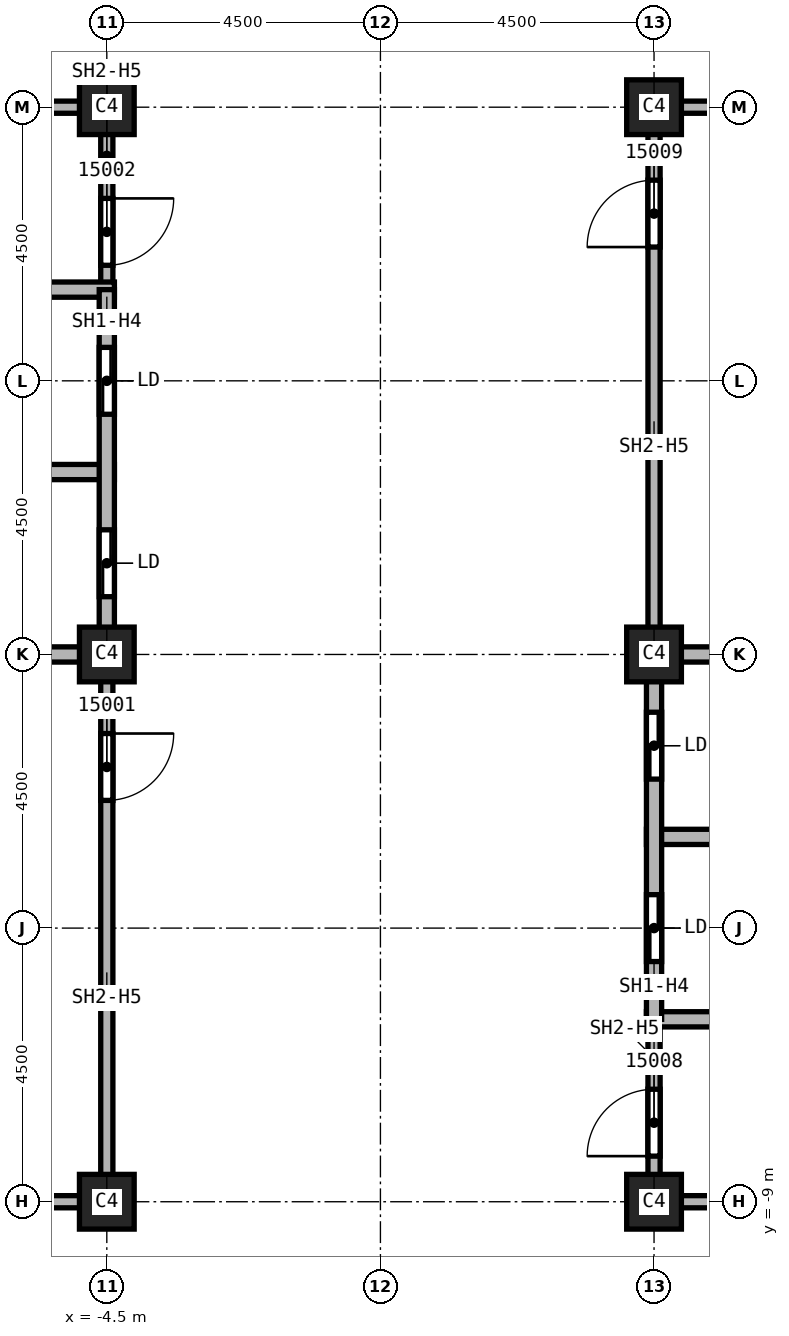
"""IFC4 building model, lengths in metres.
Left out: names, types, materials, properties, quantities, classifications, styles, units other than length and angle.
Written with IfcOpenShell. Run it as: python <this file> out.ifc"""

import sys

from ifc_helpers import new_model, si_unit, direction, frame, frame_2d, origin, origin_2d, place, context, subcontext, project, spatial, rectangle, extrude, element, fill, save


model = new_model("IFC4")
c1 = context("Model", 3, precision=1e-05, world=origin(), true_north=direction((0.0, 1.0)))
c2 = subcontext(c1, "Body", "Model", "MODEL_VIEW")
j1 = project(units=[si_unit("LENGTHUNIT", "METRE"), si_unit("PLANEANGLEUNIT", "RADIAN")], contexts=[c1])
p1 = place(None, origin())
s1 = spatial("IfcSite", under=j1, at=p1, CompositionType="ELEMENT")
p2 = place(p1, origin())
s2 = spatial("IfcBuilding", under=s1, at=p2, CompositionType="ELEMENT")
p3 = place(p2, frame((0.0, 0.0, 228.0)))
s3 = spatial("IfcBuildingStorey", under=s2, at=p3, CompositionType="ELEMENT", Elevation=228.0)
for number, where, z_axis, x_axis in (
    (1, (4.5, 0.0, 0.0), (0.0, 0.0, 1.0), (1.0, 0.0, 0.0)),
    (2, (4.5, 9.0, 0.0), (0.0, 0.0, 1.0), (1.0, 0.0, 0.0)),
    (3, (4.5, -9.0, 0.0), (0.0, 0.0, 1.0), (1.0, 0.0, 0.0)),
    (4, (-4.5, 0.0, 0.0), (0.0, 0.0, 1.0), (1.0, 0.0, 0.0)),
    (5, (-4.5, 9.0, 0.0), (0.0, 0.0, 1.0), (1.0, 0.0, 0.0)),
    (6, (-4.5, -9.0, 0.0), (0.0, 0.0, 1.0), (1.0, 0.0, 0.0)),
):
    element("IfcColumn", number, at=place(p3, frame(where, z_axis=z_axis, x_axis=x_axis)), inside=s3, PredefinedType="COLUMN", context=c2, shape_type="SweptSolid", body=[
        extrude(rectangle(XDim=0.9, YDim=0.9, at=origin_2d()), origin(), (0.0, 0.0, 1.0), 3.72),
    ])
for number, where, z_axis, x_axis in (
    (7, (-7.5, 9.0, 0.0), (0.0, 0.0, 1.0), (1.0, 0.0, 0.0)),
    (8, (-4.5, -9.0, 0.0), (0.0, 0.0, 1.0), (-1.0, 0.0, 0.0)),
):
    element("IfcWall", number, at=place(p3, frame(where, z_axis=z_axis, x_axis=x_axis)), inside=s3, PredefinedType="SOLIDWALL", context=c2, shape_type="SweptSolid", body=[
        extrude(rectangle(XDim=3.0, YDim=0.2, at=frame_2d((1.5, 0.0))), origin(), (0.0, 0.0, 1.0), 2.958),
    ])
p4 = place(p3, frame((-4.5, 0.0, 0.0), z_axis=(0.0, 0.0, 1.0), x_axis=(0.0, -1.0, 0.0)))
e9 = element("IfcWall", 9, at=p4, inside=s3, PredefinedType="SOLIDWALL", context=c2, shape_type="SweptSolid", body=[
    extrude(rectangle(XDim=9.1, YDim=0.2, at=frame_2d((4.55, 0.0))), origin(), (0.0, 0.0, 1.0), 2.958),
])
p5 = place(p4, frame((1.3, 0.0, 0.0)))
e10 = element("IfcOpeningElement", 10, at=p5, cuts=e9, PredefinedType="OPENING", context=c2, shape_type="SweptSolid", body=[
    extrude(rectangle(XDim=1.1, YDim=2.1, at=frame_2d((0.55, 1.05))), frame((0.0, 0.1, 0.0), z_axis=(0.0, -1.0, 0.0), x_axis=(1.0, 0.0, 0.0)), (0.0, 0.0, 1.0), 0.2),
])
p6 = place(p3, frame((-4.5, 9.1, 0.0), z_axis=(0.0, 0.0, 1.0), x_axis=(0.0, -1.0, 0.0)))
e11 = element("IfcWall", 11, at=p6, inside=s3, PredefinedType="SOLIDWALL", context=c2, shape_type="SweptSolid", body=[
    extrude(rectangle(XDim=3.1, YDim=0.2, at=frame_2d((1.55, 0.0))), origin(), (0.0, 0.0, 1.0), 2.958),
])
p7 = place(p6, frame((1.6, 0.0, 0.0)))
e12 = element("IfcOpeningElement", 12, at=p7, cuts=e11, PredefinedType="OPENING", context=c2, shape_type="SweptSolid", body=[
    extrude(rectangle(XDim=1.1, YDim=2.1, at=frame_2d((0.55, 1.05))), frame((0.0, 0.1, 0.0), z_axis=(0.0, -1.0, 0.0), x_axis=(1.0, 0.0, 0.0)), (0.0, 0.0, 1.0), 0.2),
])
p8 = place(p3, frame((4.5, -9.1, 0.0), z_axis=(0.0, 0.0, 1.0), x_axis=(0.0, 1.0, 0.0)))
e13 = element("IfcWall", 13, at=p8, inside=s3, PredefinedType="SOLIDWALL", context=c2, shape_type="SweptSolid", body=[
    extrude(rectangle(XDim=3.1, YDim=0.2, at=frame_2d((1.55, 0.0))), origin(), (0.0, 0.0, 1.0), 2.958),
])
p9 = place(p8, frame((0.85, 0.0, 0.0)))
e14 = element("IfcOpeningElement", 14, at=p9, cuts=e13, PredefinedType="OPENING", context=c2, shape_type="SweptSolid", body=[
    extrude(rectangle(XDim=1.1, YDim=2.1, at=frame_2d((0.55, 1.05))), frame((0.0, 0.1, 0.0), z_axis=(0.0, -1.0, 0.0), x_axis=(1.0, 0.0, 0.0)), (0.0, 0.0, 1.0), 0.2),
])
p10 = place(p3, frame((4.5, 0.0, 0.0), z_axis=(0.0, 0.0, 1.0), x_axis=(0.0, 1.0, 0.0)))
e15 = element("IfcWall", 15, at=p10, inside=s3, PredefinedType="SOLIDWALL", context=c2, shape_type="SweptSolid", body=[
    extrude(rectangle(XDim=9.1, YDim=0.2, at=frame_2d((4.55, 0.0))), origin(), (0.0, 0.0, 1.0), 2.958),
])
p11 = place(p10, frame((6.7, 0.0, 0.0)))
e16 = element("IfcOpeningElement", 16, at=p11, cuts=e15, PredefinedType="OPENING", context=c2, shape_type="SweptSolid", body=[
    extrude(rectangle(XDim=1.1, YDim=2.1, at=frame_2d((0.55, 1.05))), frame((0.0, 0.1, 0.0), z_axis=(0.0, -1.0, 0.0), x_axis=(1.0, 0.0, 0.0)), (0.0, 0.0, 1.0), 0.2),
])
for number, where, z_axis, x_axis in (
    (17, (4.5, 9.0, 0.0), (0.0, 0.0, 1.0), (1.0, 0.0, 0.0)),
    (18, (7.5, -9.0, 0.0), (0.0, 0.0, 1.0), (-1.0, 0.0, 0.0)),
):
    element("IfcWall", number, at=place(p3, frame(where, z_axis=z_axis, x_axis=x_axis)), inside=s3, PredefinedType="SOLIDWALL", context=c2, shape_type="SweptSolid", body=[
        extrude(rectangle(XDim=3.0, YDim=0.2, at=frame_2d((1.5, 0.0))), origin(), (0.0, 0.0, 1.0), 2.958),
    ])
p12 = place(p3, frame((-13.625, 3.0, 0.0), z_axis=(0.0, 0.0, 1.0), x_axis=(1.0, 0.0, 0.0)))
e19 = element("IfcWall", 19, at=p12, inside=s3, PredefinedType="SOLIDWALL", context=c2, shape_type="SweptSolid", body=[
    extrude(rectangle(XDim=9.25, YDim=0.25, at=frame_2d((4.625, 0.0))), origin(), (0.0, 0.0, 1.0), 3.72),
])
p13 = place(p12, frame((3.25, 0.0, 0.0)))
e20 = element("IfcOpeningElement", 20, at=p13, cuts=e19, PredefinedType="OPENING", context=c2, shape_type="SweptSolid", body=[
    extrude(rectangle(XDim=1.1, YDim=2.1, at=frame_2d((0.55, 1.05))), frame((0.0, 0.125, 0.0), z_axis=(0.0, -1.0, 0.0), x_axis=(1.0, 0.0, 0.0)), (0.0, 0.0, 1.0), 0.25),
])
for number, where, z_axis, x_axis in (
    (21, (-7.625, 0.0, 0.0), (0.0, 0.0, 1.0), (1.0, 0.0, 0.0)),
    (22, (-7.625, 6.0, 0.0), (0.0, 0.0, 1.0), (1.0, 0.0, 0.0)),
):
    element("IfcWall", number, at=place(p3, frame(where, z_axis=z_axis, x_axis=x_axis)), inside=s3, PredefinedType="SOLIDWALL", context=c2, shape_type="SweptSolid", body=[
        extrude(rectangle(XDim=3.25, YDim=0.25, at=frame_2d((1.625, 0.0))), origin(), (0.0, 0.0, 1.0), 3.72),
    ])
p14 = place(p3, frame((-4.5, 6.0, 0.0), z_axis=(0.0, 0.0, 1.0), x_axis=(0.0, -1.0, 0.0)))
e23 = element("IfcWall", 23, at=p14, inside=s3, PredefinedType="SOLIDWALL", context=c2, shape_type="SweptSolid", body=[
    extrude(rectangle(XDim=6.0, YDim=0.25, at=frame_2d((3.0, 0.0))), origin(), (0.0, 0.0, 1.0), 2.958),
])
p15 = place(p14, frame((3.95, 0.0, 0.0)))
e24 = element("IfcOpeningElement", 24, at=p15, cuts=e23, PredefinedType="OPENING", context=c2, shape_type="SweptSolid", body=[
    extrude(rectangle(XDim=1.1, YDim=2.1, at=frame_2d((0.55, 1.05))), frame((0.0, 0.125, 0.0), z_axis=(0.0, -1.0, 0.0), x_axis=(1.0, 0.0, 0.0)), (0.0, 0.0, 1.0), 0.25),
])
p16 = place(p14, frame((0.95, 0.0, 0.0)))
e25 = element("IfcOpeningElement", 25, at=p16, cuts=e23, PredefinedType="OPENING", context=c2, shape_type="SweptSolid", body=[
    extrude(rectangle(XDim=1.1, YDim=2.1, at=frame_2d((0.55, 1.05))), frame((0.0, 0.125, 0.0), z_axis=(0.0, -1.0, 0.0), x_axis=(1.0, 0.0, 0.0)), (0.0, 0.0, 1.0), 0.25),
])
p17 = place(p3, frame((4.375, -6.0, 0.0), z_axis=(0.0, 0.0, 1.0), x_axis=(1.0, 0.0, 0.0)))
e26 = element("IfcWall", 26, at=p17, inside=s3, PredefinedType="SOLIDWALL", context=c2, shape_type="SweptSolid", body=[
    extrude(rectangle(XDim=3.25, YDim=0.25, at=frame_2d((1.625, 0.0))), origin(), (0.0, 0.0, 1.0), 3.72),
])
p18 = place(p3, frame((4.375, -3.0, 0.0), z_axis=(0.0, 0.0, 1.0), x_axis=(1.0, 0.0, 0.0)))
e27 = element("IfcWall", 27, at=p18, inside=s3, PredefinedType="SOLIDWALL", context=c2, shape_type="SweptSolid", body=[
    extrude(rectangle(XDim=9.25, YDim=0.25, at=frame_2d((4.625, 0.0))), origin(), (0.0, 0.0, 1.0), 3.72),
])
p19 = place(p18, frame((4.875, 0.0, 0.0)))
e28 = element("IfcOpeningElement", 28, at=p19, cuts=e27, PredefinedType="OPENING", context=c2, shape_type="SweptSolid", body=[
    extrude(rectangle(XDim=1.1, YDim=2.1, at=frame_2d((0.55, 1.05))), frame((0.0, 0.125, 0.0), z_axis=(0.0, -1.0, 0.0), x_axis=(1.0, 0.0, 0.0)), (0.0, 0.0, 1.0), 0.25),
])
p20 = place(p3, frame((4.375, 0.0, 0.0), z_axis=(0.0, 0.0, 1.0), x_axis=(1.0, 0.0, 0.0)))
e29 = element("IfcWall", 29, at=p20, inside=s3, PredefinedType="SOLIDWALL", context=c2, shape_type="SweptSolid", body=[
    extrude(rectangle(XDim=3.25, YDim=0.25, at=frame_2d((1.625, 0.0))), origin(), (0.0, 0.0, 1.0), 3.72),
])
p21 = place(p3, frame((4.5, -6.0, 0.0), z_axis=(0.0, 0.0, 1.0), x_axis=(0.0, 1.0, 0.0)))
e30 = element("IfcWall", 30, at=p21, inside=s3, PredefinedType="SOLIDWALL", context=c2, shape_type="SweptSolid", body=[
    extrude(rectangle(XDim=6.0, YDim=0.25, at=frame_2d((3.0, 0.0))), origin(), (0.0, 0.0, 1.0), 2.958),
])
p22 = place(p21, frame((0.95, 0.0, 0.0)))
e31 = element("IfcOpeningElement", 31, at=p22, cuts=e30, PredefinedType="OPENING", context=c2, shape_type="SweptSolid", body=[
    extrude(rectangle(XDim=1.1, YDim=2.1, at=frame_2d((0.55, 1.05))), frame((0.0, 0.125, 0.0), z_axis=(0.0, -1.0, 0.0), x_axis=(1.0, 0.0, 0.0)), (0.0, 0.0, 1.0), 0.25),
])
p23 = place(p21, frame((3.95, 0.0, 0.0)))
e32 = element("IfcOpeningElement", 32, at=p23, cuts=e30, PredefinedType="OPENING", context=c2, shape_type="SweptSolid", body=[
    extrude(rectangle(XDim=1.1, YDim=2.1, at=frame_2d((0.55, 1.05))), frame((0.0, 0.125, 0.0), z_axis=(0.0, -1.0, 0.0), x_axis=(1.0, 0.0, 0.0)), (0.0, 0.0, 1.0), 0.25),
])
p24 = place(p5, origin())
e33 = element("IfcDoor", 33, at=p24, inside=s3, OperationType="SINGLE_SWING_RIGHT", PredefinedType="DOOR", context=c2, shape_type="SweptSolid", body=[
    extrude(rectangle(XDim=1.1, YDim=2.1, at=frame_2d((0.55, 1.05))), frame((0.0, 0.025, 0.0), z_axis=(0.0, -1.0, 0.0), x_axis=(1.0, 0.0, 0.0)), (0.0, 0.0, 1.0), 0.05),
])
fill(e10, e33)
p25 = place(p7, origin())
e34 = element("IfcDoor", 34, at=p25, inside=s3, OperationType="SINGLE_SWING_LEFT", PredefinedType="DOOR", context=c2, shape_type="SweptSolid", body=[
    extrude(rectangle(XDim=1.1, YDim=2.1, at=frame_2d((0.55, 1.05))), frame((0.0, 0.025, 0.0), z_axis=(0.0, -1.0, 0.0), x_axis=(1.0, 0.0, 0.0)), (0.0, 0.0, 1.0), 0.05),
])
fill(e12, e34)
p26 = place(p9, origin())
e35 = element("IfcDoor", 35, at=p26, inside=s3, OperationType="SINGLE_SWING_LEFT", PredefinedType="DOOR", context=c2, shape_type="SweptSolid", body=[
    extrude(rectangle(XDim=1.1, YDim=2.1, at=frame_2d((0.55, 1.05))), frame((0.0, 0.025, 0.0), z_axis=(0.0, -1.0, 0.0), x_axis=(1.0, 0.0, 0.0)), (0.0, 0.0, 1.0), 0.05),
])
fill(e14, e35)
p27 = place(p11, origin())
e36 = element("IfcDoor", 36, at=p27, inside=s3, OperationType="SINGLE_SWING_RIGHT", PredefinedType="DOOR", context=c2, shape_type="SweptSolid", body=[
    extrude(rectangle(XDim=1.1, YDim=2.1, at=frame_2d((0.55, 1.05))), frame((0.0, 0.025, 0.0), z_axis=(0.0, -1.0, 0.0), x_axis=(1.0, 0.0, 0.0)), (0.0, 0.0, 1.0), 0.05),
])
fill(e16, e36)
p28 = place(p15, origin())
e37 = element("IfcDoor", 37, at=p28, inside=s3, OperationType="SLIDING_TO_LEFT", PredefinedType="DOOR", context=c2, shape_type="SweptSolid", body=[
    extrude(rectangle(XDim=1.1, YDim=2.1, at=frame_2d((0.55, 1.05))), frame((0.0, 0.025, 0.0), z_axis=(0.0, -1.0, 0.0), x_axis=(1.0, 0.0, 0.0)), (0.0, 0.0, 1.0), 0.05),
])
fill(e24, e37)
p29 = place(p16, origin())
e38 = element("IfcDoor", 38, at=p29, inside=s3, OperationType="SLIDING_TO_LEFT", PredefinedType="DOOR", context=c2, shape_type="SweptSolid", body=[
    extrude(rectangle(XDim=1.1, YDim=2.1, at=frame_2d((0.55, 1.05))), frame((0.0, 0.025, 0.0), z_axis=(0.0, -1.0, 0.0), x_axis=(1.0, 0.0, 0.0)), (0.0, 0.0, 1.0), 0.05),
])
fill(e25, e38)
p30 = place(p22, origin())
e39 = element("IfcDoor", 39, at=p30, inside=s3, OperationType="SLIDING_TO_LEFT", PredefinedType="DOOR", context=c2, shape_type="SweptSolid", body=[
    extrude(rectangle(XDim=1.1, YDim=2.1, at=frame_2d((0.55, 1.05))), frame((0.0, 0.025, 0.0), z_axis=(0.0, -1.0, 0.0), x_axis=(1.0, 0.0, 0.0)), (0.0, 0.0, 1.0), 0.05),
])
fill(e31, e39)
p31 = place(p23, origin())
e40 = element("IfcDoor", 40, at=p31, inside=s3, OperationType="SLIDING_TO_LEFT", PredefinedType="DOOR", context=c2, shape_type="SweptSolid", body=[
    extrude(rectangle(XDim=1.1, YDim=2.1, at=frame_2d((0.55, 1.05))), frame((0.0, 0.025, 0.0), z_axis=(0.0, -1.0, 0.0), x_axis=(1.0, 0.0, 0.0)), (0.0, 0.0, 1.0), 0.05),
])
fill(e32, e40)
save(model, sys.argv[1])
